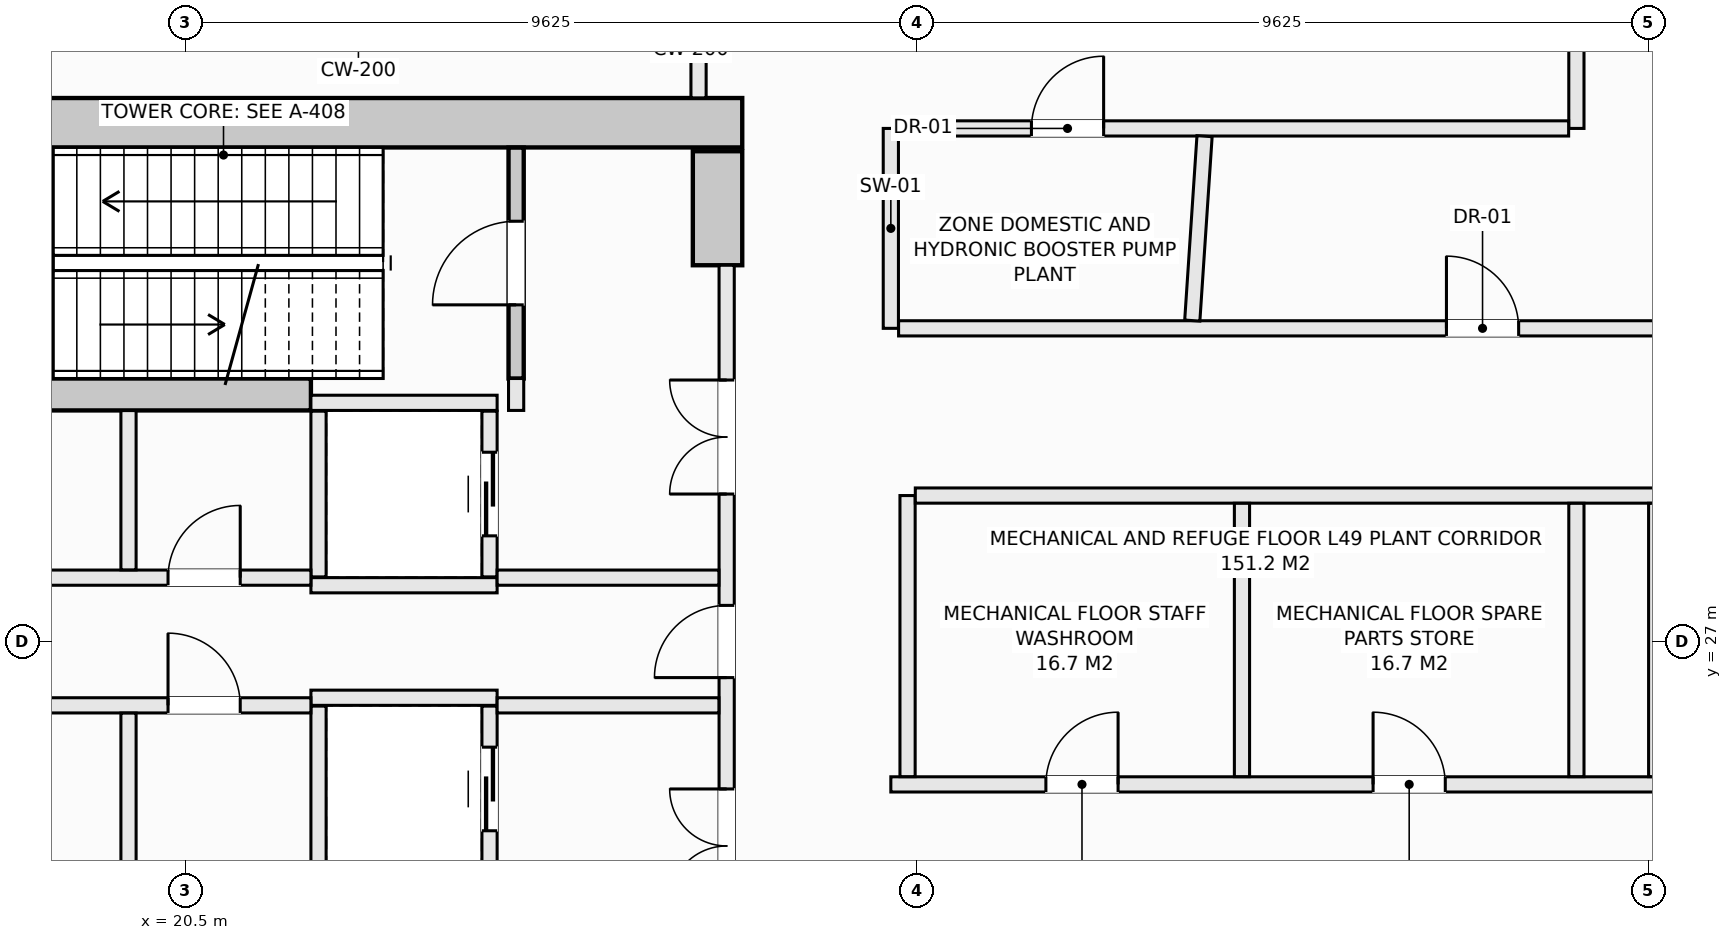
"""IFC4 building model, lengths in metres.
Left out: names, types, materials, properties, quantities, classifications, styles, units other than length and angle.
Written with IfcOpenShell. Run it as: python <this file> out.ifc"""

import sys

from ifc_helpers import new_model, si_unit, direction, frame, frame_2d, origin, place, context, subcontext, project, spatial, rectangle, extrude, element, fill, save


model = new_model("IFC4")
c1 = context("Model", 3, precision=1e-05, world=origin(), true_north=direction((0.0, 1.0)))
c2 = subcontext(c1, "Body", "Model", "MODEL_VIEW")
j1 = project(units=[si_unit("LENGTHUNIT", "METRE"), si_unit("PLANEANGLEUNIT", "RADIAN")], contexts=[c1])
p1 = place(None, origin())
s1 = spatial("IfcSite", under=j1, at=p1, CompositionType="ELEMENT")
p2 = place(p1, origin())
s2 = spatial("IfcBuilding", under=s1, at=p2, CompositionType="ELEMENT")
p3 = place(p2, frame((0.0, 0.0, 186.9)))
s3 = spatial("IfcBuildingStorey", under=s2, at=p3, CompositionType="ELEMENT", Elevation=186.9)
p4 = place(p3, frame((14.175, 33.825, -0.32), z_axis=(0.0, 0.0, 1.0), x_axis=(1.0, 0.0, 0.0)))
e1 = element("IfcWall", 1, at=p4, inside=s3, PredefinedType="SHEAR", context=c2, shape_type="SweptSolid", body=[
    extrude(rectangle(XDim=13.65, YDim=0.65, at=frame_2d((6.825, 0.0))), origin(), (0.0, 0.0, 1.0), 5.04),
])
p5 = place(p3, frame((27.5, 31.95, -0.32), z_axis=(0.0, 0.0, 1.0), x_axis=(0.0, 1.0, 0.0)))
e2 = element("IfcWall", 2, at=p5, inside=s3, PredefinedType="SHEAR", context=c2, shape_type="SweptSolid", body=[
    extrude(rectangle(XDim=1.5, YDim=0.65, at=frame_2d((0.75, 0.0))), origin(), (0.0, 0.0, 1.0), 5.04),
])
p6 = place(p3, frame((14.85, 30.25, -0.32), z_axis=(0.0, 0.0, 1.0), x_axis=(1.0, 0.0, 0.0)))
e3 = element("IfcWall", 3, at=p6, inside=s3, PredefinedType="SHEAR", context=c2, shape_type="SweptSolid", body=[
    extrude(rectangle(XDim=7.3, YDim=0.42, at=frame_2d((3.65, 0.0))), origin(), (0.0, 0.0, 1.0), 5.04),
])
p7 = place(p3, frame((24.85, 30.46, -0.32), z_axis=(0.0, 0.0, 1.0), x_axis=(0.0, 1.0, 0.0)))
e4 = element("IfcWall", 4, at=p7, inside=s3, PredefinedType="SHEAR", context=c2, shape_type="SweptSolid", body=[
    extrude(rectangle(XDim=3.038, YDim=0.2, at=frame_2d((1.519, 0.0))), origin(), (0.0, 0.0, 1.0), 5.04),
])
p8 = place(p7, frame((0.969, 0.0, 0.32)))
e5 = element("IfcOpeningElement", 5, at=p8, cuts=e4, PredefinedType="OPENING", context=c2, shape_type="SweptSolid", body=[
    extrude(rectangle(XDim=1.1, YDim=2.15, at=frame_2d((0.55, 1.075))), frame((0.0, 0.11, 0.0), z_axis=(0.0, -1.0, 0.0), x_axis=(1.0, 0.0, 0.0)), (0.0, 0.0, 1.0), 0.22),
])
for number, where, z_axis, x_axis in (
    (6, (22.15, 30.14, 0.0), (0.0, 0.0, 1.0), (1.0, 0.0, 0.0)),
    (7, (22.15, 27.74, 0.0), (0.0, 0.0, 1.0), (1.0, 0.0, 0.0)),
):
    element("IfcWall", number, at=place(p3, frame(where, z_axis=z_axis, x_axis=x_axis)), inside=s3, PredefinedType="SOLIDWALL", context=c2, shape_type="SweptSolid", body=[
        extrude(rectangle(XDim=2.45, YDim=0.2, at=frame_2d((1.225, 0.0))), origin(), (0.0, 0.0, 1.0), 4.72),
    ])
p9 = place(p3, frame((22.25, 27.85, 0.0), z_axis=(0.0, 0.0, 1.0), x_axis=(0.0, 1.0, 0.0)))
e8 = element("IfcWall", 8, at=p9, inside=s3, PredefinedType="SOLIDWALL", context=c2, shape_type="SweptSolid", body=[
    extrude(rectangle(XDim=2.18, YDim=0.2, at=frame_2d((1.09, 0.0))), origin(), (0.0, 0.0, 1.0), 4.72),
])
p10 = place(p3, frame((24.5, 27.85, 0.0), z_axis=(0.0, 0.0, 1.0), x_axis=(0.0, 1.0, 0.0)))
e9 = element("IfcWall", 9, at=p10, inside=s3, PredefinedType="SOLIDWALL", context=c2, shape_type="SweptSolid", body=[
    extrude(rectangle(XDim=2.18, YDim=0.2, at=frame_2d((1.09, 0.0))), origin(), (0.0, 0.0, 1.0), 4.72),
])
p11 = place(p10, frame((0.54, 0.0, 0.0)))
e10 = element("IfcOpeningElement", 10, at=p11, cuts=e9, PredefinedType="OPENING", context=c2, shape_type="SweptSolid", body=[
    extrude(rectangle(XDim=1.1, YDim=2.2, at=frame_2d((0.55, 1.1))), frame((0.0, 0.11, 0.0), z_axis=(0.0, -1.0, 0.0), x_axis=(1.0, 0.0, 0.0)), (0.0, 0.0, 1.0), 0.22),
])
p12 = place(p3, frame((22.15, 26.26, 0.0), z_axis=(0.0, 0.0, 1.0), x_axis=(1.0, 0.0, 0.0)))
e11 = element("IfcWall", 11, at=p12, inside=s3, PredefinedType="SOLIDWALL", context=c2, shape_type="SweptSolid", body=[
    extrude(rectangle(XDim=2.45, YDim=0.2, at=frame_2d((1.225, 0.0))), origin(), (0.0, 0.0, 1.0), 4.72),
])
p13 = place(p3, frame((22.25, 23.97, 0.0), z_axis=(0.0, 0.0, 1.0), x_axis=(0.0, 1.0, 0.0)))
e12 = element("IfcWall", 12, at=p13, inside=s3, PredefinedType="SOLIDWALL", context=c2, shape_type="SweptSolid", body=[
    extrude(rectangle(XDim=2.18, YDim=0.2, at=frame_2d((1.09, 0.0))), origin(), (0.0, 0.0, 1.0), 4.72),
])
p14 = place(p3, frame((24.5, 23.97, 0.0), z_axis=(0.0, 0.0, 1.0), x_axis=(0.0, 1.0, 0.0)))
e13 = element("IfcWall", 13, at=p14, inside=s3, PredefinedType="SOLIDWALL", context=c2, shape_type="SweptSolid", body=[
    extrude(rectangle(XDim=2.18, YDim=0.2, at=frame_2d((1.09, 0.0))), origin(), (0.0, 0.0, 1.0), 4.72),
])
p15 = place(p14, frame((0.54, 0.0, 0.0)))
e14 = element("IfcOpeningElement", 14, at=p15, cuts=e13, PredefinedType="OPENING", context=c2, shape_type="SweptSolid", body=[
    extrude(rectangle(XDim=1.1, YDim=2.2, at=frame_2d((0.55, 1.1))), frame((0.0, 0.11, 0.0), z_axis=(0.0, -1.0, 0.0), x_axis=(1.0, 0.0, 0.0)), (0.0, 0.0, 1.0), 0.22),
])
p16 = place(p3, frame((24.85, 30.04, 0.0), z_axis=(0.0, 0.0, 1.0), x_axis=(0.0, 1.0, 0.0)))
e15 = element("IfcWall", 15, at=p16, inside=s3, PredefinedType="SOLIDWALL", context=c2, shape_type="SweptSolid", body=[
    extrude(rectangle(XDim=0.42, YDim=0.2, at=frame_2d((0.21, 0.0))), origin(), (0.0, 0.0, 1.0), 4.72),
])
p17 = place(p3, frame((27.62, 22.05, 0.0), z_axis=(0.0, 0.0, 1.0), x_axis=(0.0, 1.0, 0.0)))
e16 = element("IfcWall", 16, at=p17, inside=s3, PredefinedType="SOLIDWALL", context=c2, shape_type="SweptSolid", body=[
    extrude(rectangle(XDim=9.9, YDim=0.2, at=frame_2d((4.95, 0.0))), origin(), (0.0, 0.0, 1.0), 3.812),
])
p18 = place(p17, frame((4.475, 0.0, 0.0)))
e17 = element("IfcOpeningElement", 17, at=p18, cuts=e16, PredefinedType="OPENING", context=c2, shape_type="SweptSolid", body=[
    extrude(rectangle(XDim=0.95, YDim=2.1, at=frame_2d((0.475, 1.05))), frame((0.0, 0.11, 0.0), z_axis=(0.0, -1.0, 0.0), x_axis=(1.0, 0.0, 0.0)), (0.0, 0.0, 1.0), 0.22),
])
p19 = place(p17, frame((6.89, 0.0, 0.0)))
e18 = element("IfcOpeningElement", 18, at=p19, cuts=e16, PredefinedType="OPENING", context=c2, shape_type="SweptSolid", body=[
    extrude(rectangle(XDim=1.5, YDim=2.2, at=frame_2d((0.75, 1.1))), frame((0.0, 0.11, 0.0), z_axis=(0.0, -1.0, 0.0), x_axis=(1.0, 0.0, 0.0)), (0.0, 0.0, 1.0), 0.22),
])
p20 = place(p17, frame((1.51, 0.0, 0.0)))
e19 = element("IfcOpeningElement", 19, at=p20, cuts=e16, PredefinedType="OPENING", context=c2, shape_type="SweptSolid", body=[
    extrude(rectangle(XDim=1.5, YDim=2.2, at=frame_2d((0.75, 1.1))), frame((0.0, 0.11, 0.0), z_axis=(0.0, -1.0, 0.0), x_axis=(1.0, 0.0, 0.0)), (0.0, 0.0, 1.0), 0.22),
])
p21 = place(p3, frame((15.25, 27.84, 0.0), z_axis=(0.0, 0.0, 1.0), x_axis=(1.0, 0.0, 0.0)))
e20 = element("IfcWall", 20, at=p21, inside=s3, PredefinedType="SOLIDWALL", context=c2, shape_type="SweptSolid", body=[
    extrude(rectangle(XDim=6.9, YDim=0.2, at=frame_2d((3.45, 0.0))), origin(), (0.0, 0.0, 1.0), 4.72),
])
p22 = place(p21, frame((5.02, 0.0, 0.0)))
e21 = element("IfcOpeningElement", 21, at=p22, cuts=e20, PredefinedType="OPENING", context=c2, shape_type="SweptSolid", body=[
    extrude(rectangle(XDim=0.95, YDim=2.1, at=frame_2d((0.475, 1.05))), frame((0.0, 0.11, 0.0), z_axis=(0.0, -1.0, 0.0), x_axis=(1.0, 0.0, 0.0)), (0.0, 0.0, 1.0), 0.22),
])
p23 = place(p21, frame((1.98, 0.0, 0.0)))
e22 = element("IfcOpeningElement", 22, at=p23, cuts=e20, PredefinedType="OPENING", context=c2, shape_type="SweptSolid", body=[
    extrude(rectangle(XDim=0.95, YDim=2.1, at=frame_2d((0.475, 1.05))), frame((0.0, 0.11, 0.0), z_axis=(0.0, -1.0, 0.0), x_axis=(1.0, 0.0, 0.0)), (0.0, 0.0, 1.0), 0.22),
])
p24 = place(p3, frame((24.6, 27.84, 0.0), z_axis=(0.0, 0.0, 1.0), x_axis=(1.0, 0.0, 0.0)))
e23 = element("IfcWall", 23, at=p24, inside=s3, PredefinedType="SOLIDWALL", context=c2, shape_type="SweptSolid", body=[
    extrude(rectangle(XDim=2.918, YDim=0.2, at=frame_2d((1.459, 0.0))), origin(), (0.0, 0.0, 1.0), 4.72),
])
p25 = place(p3, frame((15.25, 26.16, 0.0), z_axis=(0.0, 0.0, 1.0), x_axis=(1.0, 0.0, 0.0)))
e24 = element("IfcWall", 24, at=p25, inside=s3, PredefinedType="SOLIDWALL", context=c2, shape_type="SweptSolid", body=[
    extrude(rectangle(XDim=6.9, YDim=0.2, at=frame_2d((3.45, 0.0))), origin(), (0.0, 0.0, 1.0), 4.72),
])
p26 = place(p25, frame((5.02, 0.0, 0.0)))
e25 = element("IfcOpeningElement", 25, at=p26, cuts=e24, PredefinedType="OPENING", context=c2, shape_type="SweptSolid", body=[
    extrude(rectangle(XDim=0.95, YDim=2.1, at=frame_2d((0.475, 1.05))), frame((0.0, 0.11, 0.0), z_axis=(0.0, -1.0, 0.0), x_axis=(1.0, 0.0, 0.0)), (0.0, 0.0, 1.0), 0.22),
])
p27 = place(p25, frame((1.98, 0.0, 0.0)))
e26 = element("IfcOpeningElement", 26, at=p27, cuts=e24, PredefinedType="OPENING", context=c2, shape_type="SweptSolid", body=[
    extrude(rectangle(XDim=0.95, YDim=2.1, at=frame_2d((0.475, 1.05))), frame((0.0, 0.11, 0.0), z_axis=(0.0, -1.0, 0.0), x_axis=(1.0, 0.0, 0.0)), (0.0, 0.0, 1.0), 0.22),
])
p28 = place(p3, frame((24.6, 26.16, 0.0), z_axis=(0.0, 0.0, 1.0), x_axis=(1.0, 0.0, 0.0)))
e27 = element("IfcWall", 27, at=p28, inside=s3, PredefinedType="SOLIDWALL", context=c2, shape_type="SweptSolid", body=[
    extrude(rectangle(XDim=2.918, YDim=0.2, at=frame_2d((1.459, 0.0))), origin(), (0.0, 0.0, 1.0), 4.72),
])
for number, where, z_axis, x_axis in (
    (28, (19.75, 23.962, 0.0), (0.0, 0.0, 1.0), (0.0, 1.0, 0.0)),
    (29, (19.75, 27.942, 0.0), (0.0, 0.0, 1.0), (0.0, 1.0, 0.0)),
):
    element("IfcWall", number, at=place(p3, frame(where, z_axis=z_axis, x_axis=x_axis)), inside=s3, PredefinedType="SOLIDWALL", context=c2, shape_type="SweptSolid", body=[
        extrude(rectangle(XDim=2.096, YDim=0.2, at=frame_2d((1.048, 0.0))), origin(), (0.0, 0.0, 1.0), 4.72),
    ])
p29 = place(p3, frame((29.78, 25.12, 0.0), z_axis=(0.0, 0.0, 1.0), x_axis=(1.0, 0.0, 0.0)))
e30 = element("IfcWall", 30, at=p29, inside=s3, PredefinedType="SOLIDWALL", context=c2, shape_type="SweptSolid", body=[
    extrude(rectangle(XDim=10.07, YDim=0.2, at=frame_2d((5.035, 0.0))), origin(), (0.0, 0.0, 1.0), 4.72),
])
p30 = place(p29, frame((2.04, 0.0, 0.0)))
e31 = element("IfcOpeningElement", 31, at=p30, cuts=e30, PredefinedType="OPENING", context=c2, shape_type="SweptSolid", body=[
    extrude(rectangle(XDim=0.95, YDim=2.1, at=frame_2d((0.475, 1.05))), frame((0.0, 0.11, 0.0), z_axis=(0.0, -1.0, 0.0), x_axis=(1.0, 0.0, 0.0)), (0.0, 0.0, 1.0), 0.22),
])
p31 = place(p29, frame((6.345, 0.0, 0.0)))
e32 = element("IfcOpeningElement", 32, at=p31, cuts=e30, PredefinedType="OPENING", context=c2, shape_type="SweptSolid", body=[
    extrude(rectangle(XDim=0.95, YDim=2.1, at=frame_2d((0.475, 1.05))), frame((0.0, 0.11, 0.0), z_axis=(0.0, -1.0, 0.0), x_axis=(1.0, 0.0, 0.0)), (0.0, 0.0, 1.0), 0.22),
])
p32 = place(p3, frame((30.0, 25.222, 0.0), z_axis=(0.0, 0.0, 1.0), x_axis=(0.0, 1.0, 0.0)))
e33 = element("IfcWall", 33, at=p32, inside=s3, PredefinedType="SOLIDWALL", context=c2, shape_type="SweptSolid", body=[
    extrude(rectangle(XDim=3.698, YDim=0.2, at=frame_2d((1.849, 0.0))), origin(), (0.0, 0.0, 1.0), 4.72),
])
p33 = place(p3, frame((30.102, 28.92, 0.0), z_axis=(0.0, 0.0, 1.0), x_axis=(1.0, 0.0, 0.0)))
e34 = element("IfcWall", 34, at=p33, inside=s3, PredefinedType="SOLIDWALL", context=c2, shape_type="SweptSolid", body=[
    extrude(rectangle(XDim=9.748, YDim=0.2, at=frame_2d((4.874, 0.0))), origin(), (0.0, 0.0, 1.0), 4.72),
])
for number, where, z_axis, x_axis in (
    (35, (34.4, 25.222, 0.0), (0.0, 0.0, 1.0), (0.0, 1.0, 0.0)),
    (36, (38.8, 25.222, 0.0), (0.0, 0.0, 1.0), (0.0, 1.0, 0.0)),
):
    element("IfcWall", number, at=place(p3, frame(where, z_axis=z_axis, x_axis=x_axis)), inside=s3, PredefinedType="SOLIDWALL", context=c2, shape_type="SweptSolid", body=[
        extrude(rectangle(XDim=3.596, YDim=0.2, at=frame_2d((1.798, 0.0))), origin(), (0.0, 0.0, 1.0), 4.72),
    ])
p34 = place(p3, frame((38.8, 33.75, 0.0), z_axis=(0.0, 0.0, 1.0), x_axis=(0.0, 1.0, 0.0)))
e37 = element("IfcWall", 37, at=p34, inside=s3, PredefinedType="SOLIDWALL", context=c2, shape_type="SweptSolid", body=[
    extrude(rectangle(XDim=2.0, YDim=0.2, at=frame_2d((1.0, 0.0))), origin(), (0.0, 0.0, 1.0), 4.72),
])
p35 = place(p3, frame((27.25, 34.152, 0.0), z_axis=(0.0, 0.0, 1.0), x_axis=(0.0, 1.0, 0.0)))
e38 = element("IfcWall", 38, at=p35, inside=s3, PredefinedType="SOLIDWALL", context=c2, shape_type="SweptSolid", body=[
    extrude(rectangle(XDim=0.806, YDim=0.2, at=frame_2d((0.403, 0.0))), origin(), (0.0, 0.0, 1.0), 4.72),
])
p36 = place(p3, frame((29.78, 31.12, 0.0), z_axis=(0.0, 0.0, 1.0), x_axis=(0.0, 1.0, 0.0)))
e39 = element("IfcWall", 39, at=p36, inside=s3, PredefinedType="SOLIDWALL", context=c2, shape_type="SweptSolid", body=[
    extrude(rectangle(XDim=2.63, YDim=0.2, at=frame_2d((1.315, 0.0))), origin(), (0.0, 0.0, 1.0), 4.72),
])
p37 = place(p3, frame((29.882, 33.75, 0.0), z_axis=(0.0, 0.0, 1.0), x_axis=(1.0, 0.0, 0.0)))
e40 = element("IfcWall", 40, at=p37, inside=s3, PredefinedType="SOLIDWALL", context=c2, shape_type="SweptSolid", body=[
    extrude(rectangle(XDim=8.816, YDim=0.2, at=frame_2d((4.408, 0.0))), origin(), (0.0, 0.0, 1.0), 4.72),
])
p38 = place(p37, frame((1.748, 0.0, 0.0)))
e41 = element("IfcOpeningElement", 41, at=p38, cuts=e40, PredefinedType="OPENING", context=c2, shape_type="SweptSolid", body=[
    extrude(rectangle(XDim=0.95, YDim=2.1, at=frame_2d((0.475, 1.05))), frame((0.0, 0.11, 0.0), z_axis=(0.0, -1.0, 0.0), x_axis=(1.0, 0.0, 0.0)), (0.0, 0.0, 1.0), 0.22),
])
p39 = place(p3, frame((29.882, 31.12, 0.0), z_axis=(0.0, 0.0, 1.0), x_axis=(1.0, 0.0, 0.0)))
e42 = element("IfcWall", 42, at=p39, inside=s3, PredefinedType="SOLIDWALL", context=c2, shape_type="SweptSolid", body=[
    extrude(rectangle(XDim=11.918, YDim=0.2, at=frame_2d((5.959, 0.0))), origin(), (0.0, 0.0, 1.0), 4.72),
])
p40 = place(p39, frame((7.208, 0.0, 0.0)))
e43 = element("IfcOpeningElement", 43, at=p40, cuts=e42, PredefinedType="OPENING", context=c2, shape_type="SweptSolid", body=[
    extrude(rectangle(XDim=0.95, YDim=2.1, at=frame_2d((0.475, 1.05))), frame((0.0, 0.11, 0.0), z_axis=(0.0, -1.0, 0.0), x_axis=(1.0, 0.0, 0.0)), (0.0, 0.0, 1.0), 0.22),
])
p41 = place(p3, frame((39.85, 25.222, 0.0), z_axis=(0.0, 0.0, 1.0), x_axis=(0.0, 1.0, 0.0)))
e44 = element("IfcWall", 44, at=p41, inside=s3, PredefinedType="SOLIDWALL", context=c2, shape_type="SweptSolid", body=[
    extrude(rectangle(XDim=3.596, YDim=0.2, at=frame_2d((1.798, 0.0))), origin(), (0.0, 0.0, 1.0), 4.72),
])
p42 = place(p3, frame((33.746, 31.222, 0.0), z_axis=(0.0, 0.0, 1.0), x_axis=(0.066472359128, 0.997788266854, 0.0)))
e45 = element("IfcWall", 45, at=p42, inside=s3, PredefinedType="SOLIDWALL", context=c2, shape_type="SweptSolid", body=[
    extrude(rectangle(XDim=2.431, YDim=0.2, at=frame_2d((1.216, 0.0))), origin(), (0.0, 0.0, 1.0), 4.72),
])
p43 = place(p8, origin())
e46 = element("IfcDoor", 46, at=p43, inside=s3, OperationType="SINGLE_SWING_LEFT", PredefinedType="DOOR", context=c2, shape_type="SweptSolid", body=[
    extrude(rectangle(XDim=1.1, YDim=2.15, at=frame_2d((0.55, 1.075))), frame((0.0, 0.025, 0.0), z_axis=(0.0, -1.0, 0.0), x_axis=(1.0, 0.0, 0.0)), (0.0, 0.0, 1.0), 0.05),
])
fill(e5, e46)
p44 = place(p11, origin())
e47 = element("IfcDoor", 47, at=p44, inside=s3, OperationType="SLIDING_TO_LEFT", PredefinedType="DOOR", context=c2, shape_type="SweptSolid", body=[
    extrude(rectangle(XDim=1.1, YDim=2.2, at=frame_2d((0.55, 1.1))), frame((0.0, 0.025, 0.0), z_axis=(0.0, -1.0, 0.0), x_axis=(1.0, 0.0, 0.0)), (0.0, 0.0, 1.0), 0.05),
])
fill(e10, e47)
p45 = place(p15, origin())
e48 = element("IfcDoor", 48, at=p45, inside=s3, OperationType="SLIDING_TO_LEFT", PredefinedType="DOOR", context=c2, shape_type="SweptSolid", body=[
    extrude(rectangle(XDim=1.1, YDim=2.2, at=frame_2d((0.55, 1.1))), frame((0.0, 0.025, 0.0), z_axis=(0.0, -1.0, 0.0), x_axis=(1.0, 0.0, 0.0)), (0.0, 0.0, 1.0), 0.05),
])
fill(e14, e48)
p46 = place(p18, origin())
e49 = element("IfcDoor", 49, at=p46, inside=s3, OperationType="SINGLE_SWING_LEFT", PredefinedType="DOOR", context=c2, shape_type="SweptSolid", body=[
    extrude(rectangle(XDim=0.95, YDim=2.1, at=frame_2d((0.475, 1.05))), frame((0.0, 0.025, 0.0), z_axis=(0.0, -1.0, 0.0), x_axis=(1.0, 0.0, 0.0)), (0.0, 0.0, 1.0), 0.05),
])
fill(e17, e49)
p47 = place(p19, origin())
e50 = element("IfcDoor", 50, at=p47, inside=s3, OperationType="DOUBLE_DOOR_SINGLE_SWING", PredefinedType="DOOR", context=c2, shape_type="SweptSolid", body=[
    extrude(rectangle(XDim=1.5, YDim=2.2, at=frame_2d((0.75, 1.1))), frame((0.0, 0.025, 0.0), z_axis=(0.0, -1.0, 0.0), x_axis=(1.0, 0.0, 0.0)), (0.0, 0.0, 1.0), 0.05),
])
fill(e18, e50)
p48 = place(p20, origin())
e51 = element("IfcDoor", 51, at=p48, inside=s3, OperationType="DOUBLE_DOOR_SINGLE_SWING", PredefinedType="DOOR", context=c2, shape_type="SweptSolid", body=[
    extrude(rectangle(XDim=1.5, YDim=2.2, at=frame_2d((0.75, 1.1))), frame((0.0, 0.025, 0.0), z_axis=(0.0, -1.0, 0.0), x_axis=(1.0, 0.0, 0.0)), (0.0, 0.0, 1.0), 0.05),
])
fill(e19, e51)
p49 = place(p22, origin())
e52 = element("IfcDoor", 52, at=p49, inside=s3, OperationType="SINGLE_SWING_RIGHT", PredefinedType="DOOR", context=c2, shape_type="SweptSolid", body=[
    extrude(rectangle(XDim=0.95, YDim=2.1, at=frame_2d((0.475, 1.05))), frame((0.0, 0.025, 0.0), z_axis=(0.0, -1.0, 0.0), x_axis=(1.0, 0.0, 0.0)), (0.0, 0.0, 1.0), 0.05),
])
fill(e21, e52)
p50 = place(p26, origin())
e53 = element("IfcDoor", 53, at=p50, inside=s3, OperationType="SINGLE_SWING_LEFT", PredefinedType="DOOR", context=c2, shape_type="SweptSolid", body=[
    extrude(rectangle(XDim=0.95, YDim=2.1, at=frame_2d((0.475, 1.05))), frame((0.0, 0.025, 0.0), z_axis=(0.0, -1.0, 0.0), x_axis=(1.0, 0.0, 0.0)), (0.0, 0.0, 1.0), 0.05),
])
fill(e25, e53)
p51 = place(p30, origin())
e54 = element("IfcDoor", 54, at=p51, inside=s3, OperationType="SINGLE_SWING_RIGHT", PredefinedType="DOOR", context=c2, shape_type="SweptSolid", body=[
    extrude(rectangle(XDim=0.95, YDim=2.1, at=frame_2d((0.475, 1.05))), frame((0.0, 0.025, 0.0), z_axis=(0.0, -1.0, 0.0), x_axis=(1.0, 0.0, 0.0)), (0.0, 0.0, 1.0), 0.05),
])
fill(e31, e54)
p52 = place(p31, origin())
e55 = element("IfcDoor", 55, at=p52, inside=s3, OperationType="SINGLE_SWING_LEFT", PredefinedType="DOOR", context=c2, shape_type="SweptSolid", body=[
    extrude(rectangle(XDim=0.95, YDim=2.1, at=frame_2d((0.475, 1.05))), frame((0.0, 0.025, 0.0), z_axis=(0.0, -1.0, 0.0), x_axis=(1.0, 0.0, 0.0)), (0.0, 0.0, 1.0), 0.05),
])
fill(e32, e55)
p53 = place(p38, origin())
e56 = element("IfcDoor", 56, at=p53, inside=s3, OperationType="SINGLE_SWING_RIGHT", PredefinedType="DOOR", context=c2, shape_type="SweptSolid", body=[
    extrude(rectangle(XDim=0.95, YDim=2.1, at=frame_2d((0.475, 1.05))), frame((0.0, 0.025, 0.0), z_axis=(0.0, -1.0, 0.0), x_axis=(1.0, 0.0, 0.0)), (0.0, 0.0, 1.0), 0.05),
])
fill(e41, e56)
p54 = place(p40, origin())
e57 = element("IfcDoor", 57, at=p54, inside=s3, OperationType="SINGLE_SWING_LEFT", PredefinedType="DOOR", context=c2, shape_type="SweptSolid", body=[
    extrude(rectangle(XDim=0.95, YDim=2.1, at=frame_2d((0.475, 1.05))), frame((0.0, 0.025, 0.0), z_axis=(0.0, -1.0, 0.0), x_axis=(1.0, 0.0, 0.0)), (0.0, 0.0, 1.0), 0.05),
])
fill(e43, e57)
save(model, sys.argv[1])
